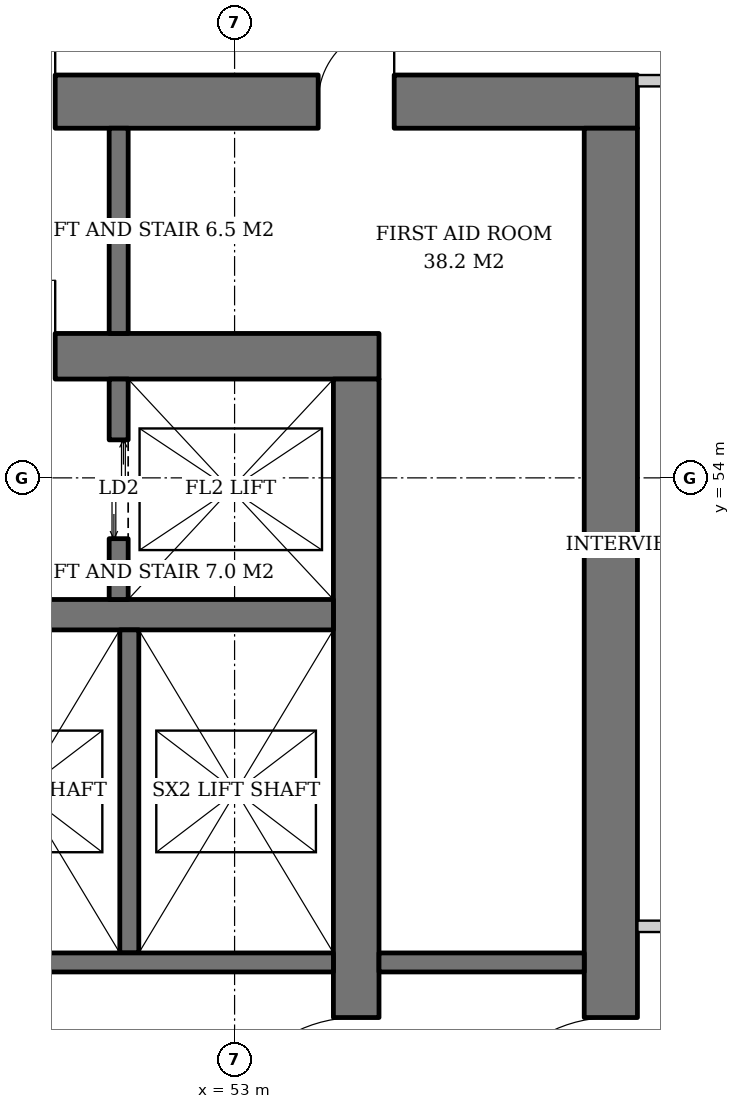
"""IFC4 building model, lengths in metres.
Left out: names, types, materials, properties, quantities, classifications, styles, units other than length and angle.
Written with IfcOpenShell. Run it as: python <this file> out.ifc"""

import sys

from ifc_helpers import new_model, si_unit, direction, frame, frame_2d, origin, place, context, subcontext, project, spatial, rectangle, extrude, element, fill, save


model = new_model("IFC4")
c1 = context("Model", 3, precision=1e-05, world=origin(), true_north=direction((0.0, 1.0)))
c2 = subcontext(c1, "Body", "Model", "MODEL_VIEW")
j1 = project(units=[si_unit("LENGTHUNIT", "METRE"), si_unit("PLANEANGLEUNIT", "RADIAN")], contexts=[c1])
p1 = place(None, origin())
s1 = spatial("IfcSite", under=j1, at=p1, CompositionType="ELEMENT")
p2 = place(p1, origin())
s2 = spatial("IfcBuilding", under=s1, at=p2, CompositionType="ELEMENT")
p3 = place(p2, frame((0.0, 0.0, 135.0)))
s3 = spatial("IfcBuildingStorey", under=s2, at=p3, CompositionType="ELEMENT", Elevation=135.0)
p4 = place(p3, frame((35.1, 55.6, 0.0), z_axis=(0.0, 0.0, 1.0), x_axis=(1.0, 0.0, 0.0)))
e1 = element("IfcWall", 1, at=p4, inside=s3, PredefinedType="SHEAR", context=c2, shape_type="SweptSolid", body=[
    extrude(rectangle(XDim=19.8, YDim=0.6, at=frame_2d((9.9, 0.0))), origin(), (0.0, 0.0, 1.0), 3.8),
])
p5 = place(p4, frame((14.54, 0.0, 0.0)))
e2 = element("IfcOpeningElement", 2, at=p5, cuts=e1, PredefinedType="OPENING", context=c2, shape_type="SweptSolid", body=[
    extrude(rectangle(XDim=1.0, YDim=2.1, at=frame_2d((0.5, 1.05))), frame((0.0, 0.31, 0.0), z_axis=(0.0, -1.0, 0.0), x_axis=(1.0, 0.0, 0.0)), (0.0, 0.0, 1.0), 0.62),
])
p6 = place(p4, frame((2.425, 0.0, 0.0)))
e3 = element("IfcOpeningElement", 3, at=p6, cuts=e1, PredefinedType="OPENING", context=c2, shape_type="SweptSolid", body=[
    extrude(rectangle(XDim=1.0, YDim=2.1, at=frame_2d((0.5, 1.05))), frame((0.0, 0.31, 0.0), z_axis=(0.0, -1.0, 0.0), x_axis=(1.0, 0.0, 0.0)), (0.0, 0.0, 1.0), 0.62),
])
p7 = place(p3, frame((54.6, 36.7, 0.0), z_axis=(0.0, 0.0, 1.0), x_axis=(0.0, 1.0, 0.0)))
e4 = element("IfcWall", 4, at=p7, inside=s3, PredefinedType="SHEAR", context=c2, shape_type="SweptSolid", body=[
    extrude(rectangle(XDim=18.6, YDim=0.6, at=frame_2d((9.3, 0.0))), origin(), (0.0, 0.0, 1.0), 3.8),
])
p8 = place(p7, frame((8.4, 0.0, 0.0)))
e5 = element("IfcOpeningElement", 5, at=p8, cuts=e4, PredefinedType="OPENING", context=c2, shape_type="SweptSolid", body=[
    extrude(rectangle(XDim=1.8, YDim=2.4, at=frame_2d((0.9, 1.2))), frame((0.0, 0.31, 0.0), z_axis=(0.0, -1.0, 0.0), x_axis=(1.0, 0.0, 0.0)), (0.0, 0.0, 1.0), 0.62),
])
p9 = place(p3, frame((31.7, 58.95, 0.0), z_axis=(0.0, 0.0, 1.0), x_axis=(1.0, 0.0, 0.0)))
e6 = element("IfcWall", 6, at=p9, inside=s3, PredefinedType="SHEAR", context=c2, shape_type="SweptSolid", body=[
    extrude(rectangle(XDim=26.6, YDim=0.7, at=frame_2d((13.3, 0.0))), origin(), (0.0, 0.0, 1.0), 3.8),
])
p10 = place(p9, frame((17.94, 0.0, 0.0)))
e7 = element("IfcOpeningElement", 7, at=p10, cuts=e6, PredefinedType="OPENING", context=c2, shape_type="SweptSolid", body=[
    extrude(rectangle(XDim=1.0, YDim=2.1, at=frame_2d((0.5, 1.05))), frame((0.0, 0.36, 0.0), z_axis=(0.0, -1.0, 0.0), x_axis=(1.0, 0.0, 0.0)), (0.0, 0.0, 1.0), 0.72),
])
p11 = place(p9, frame((5.825, 0.0, 0.0)))
e8 = element("IfcOpeningElement", 8, at=p11, cuts=e6, PredefinedType="OPENING", context=c2, shape_type="SweptSolid", body=[
    extrude(rectangle(XDim=1.0, YDim=2.1, at=frame_2d((0.5, 1.05))), frame((0.0, 0.36, 0.0), z_axis=(0.0, -1.0, 0.0), x_axis=(1.0, 0.0, 0.0)), (0.0, 0.0, 1.0), 0.72),
])
p12 = place(p9, frame((1.073, 0.0, 0.0)))
e9 = element("IfcOpeningElement", 9, at=p12, cuts=e6, PredefinedType="OPENING", context=c2, shape_type="SweptSolid", body=[
    extrude(rectangle(XDim=1.0, YDim=2.1, at=frame_2d((0.5, 1.05))), frame((0.0, 0.36, 0.0), z_axis=(0.0, -1.0, 0.0), x_axis=(1.0, 0.0, 0.0)), (0.0, 0.0, 1.0), 0.72),
])
p13 = place(p9, frame((2.611, 0.0, 0.0)))
e10 = element("IfcOpeningElement", 10, at=p13, cuts=e6, PredefinedType="OPENING", context=c2, shape_type="SweptSolid", body=[
    extrude(rectangle(XDim=1.0, YDim=2.1, at=frame_2d((0.5, 1.05))), frame((0.0, 0.36, 0.0), z_axis=(0.0, -1.0, 0.0), x_axis=(1.0, 0.0, 0.0)), (0.0, 0.0, 1.0), 0.72),
])
p14 = place(p9, frame((4.187, 0.0, 0.0)))
e11 = element("IfcOpeningElement", 11, at=p14, cuts=e6, PredefinedType="OPENING", context=c2, shape_type="SweptSolid", body=[
    extrude(rectangle(XDim=1.0, YDim=2.1, at=frame_2d((0.5, 1.05))), frame((0.0, 0.36, 0.0), z_axis=(0.0, -1.0, 0.0), x_axis=(1.0, 0.0, 0.0)), (0.0, 0.0, 1.0), 0.72),
])
p15 = place(p9, frame((8.44, 0.0, 0.0)))
e12 = element("IfcOpeningElement", 12, at=p15, cuts=e6, PredefinedType="OPENING", context=c2, shape_type="SweptSolid", body=[
    extrude(rectangle(XDim=1.0, YDim=2.1, at=frame_2d((0.5, 1.05))), frame((0.0, 0.36, 0.0), z_axis=(0.0, -1.0, 0.0), x_axis=(1.0, 0.0, 0.0)), (0.0, 0.0, 1.0), 0.72),
])
p16 = place(p9, frame((13.342, 0.0, 0.0)))
e13 = element("IfcOpeningElement", 13, at=p16, cuts=e6, PredefinedType="OPENING", context=c2, shape_type="SweptSolid", body=[
    extrude(rectangle(XDim=1.0, YDim=2.1, at=frame_2d((0.5, 1.05))), frame((0.0, 0.36, 0.0), z_axis=(0.0, -1.0, 0.0), x_axis=(1.0, 0.0, 0.0)), (0.0, 0.0, 1.0), 0.72),
])
p17 = place(p9, frame((22.4, 0.0, 0.0)))
e14 = element("IfcOpeningElement", 14, at=p17, cuts=e6, PredefinedType="OPENING", context=c2, shape_type="SweptSolid", body=[
    extrude(rectangle(XDim=1.0, YDim=2.1, at=frame_2d((0.5, 1.05))), frame((0.0, 0.36, 0.0), z_axis=(0.0, -1.0, 0.0), x_axis=(1.0, 0.0, 0.0)), (0.0, 0.0, 1.0), 0.72),
])
p18 = place(p3, frame((57.95, 33.4, 0.0), z_axis=(0.0, 0.0, 1.0), x_axis=(0.0, 1.0, 0.0)))
e15 = element("IfcWall", 15, at=p18, inside=s3, PredefinedType="SHEAR", context=c2, shape_type="SweptSolid", body=[
    extrude(rectangle(XDim=25.2, YDim=0.7, at=frame_2d((12.6, 0.0))), origin(), (0.0, 0.0, 1.0), 3.8),
])
p19 = place(p18, frame((11.7, 0.0, 0.0)))
e16 = element("IfcOpeningElement", 16, at=p19, cuts=e15, PredefinedType="OPENING", context=c2, shape_type="SweptSolid", body=[
    extrude(rectangle(XDim=1.8, YDim=2.4, at=frame_2d((0.9, 1.2))), frame((0.0, 0.36, 0.0), z_axis=(0.0, -1.0, 0.0), x_axis=(1.0, 0.0, 0.0)), (0.0, 0.0, 1.0), 0.72),
])
p20 = place(p3, frame((35.7, 52.2, 0.0), z_axis=(0.0, 0.0, 1.0), x_axis=(1.0, 0.0, 0.0)))
e17 = element("IfcWall", 17, at=p20, inside=s3, PredefinedType="SHEAR", context=c2, shape_type="SweptSolid", body=[
    extrude(rectangle(XDim=18.6, YDim=0.4, at=frame_2d((9.3, 0.0))), origin(), (0.0, 0.0, 1.0), 3.8),
])
p21 = place(p3, frame((51.475, 52.4, 0.0), z_axis=(0.0, 0.0, 1.0), x_axis=(0.0, 1.0, 0.0)))
e18 = element("IfcWall", 18, at=p21, inside=s3, PredefinedType="SHEAR", context=c2, shape_type="SweptSolid", body=[
    extrude(rectangle(XDim=2.9, YDim=0.25, at=frame_2d((1.45, 0.0))), origin(), (0.0, 0.0, 1.0), 3.8),
])
p22 = place(p21, frame((0.8, 0.0, 0.0)))
e19 = element("IfcOpeningElement", 19, at=p22, cuts=e18, PredefinedType="OPENING", context=c2, shape_type="SweptSolid", body=[
    extrude(rectangle(XDim=1.3, YDim=2.2, at=frame_2d((0.65, 1.1))), frame((0.0, 0.135, 0.0), z_axis=(0.0, -1.0, 0.0), x_axis=(1.0, 0.0, 0.0)), (0.0, 0.0, 1.0), 0.27),
])
p23 = place(p3, frame((51.615, 47.75, 0.0), z_axis=(0.0, 0.0, 1.0), x_axis=(0.0, 1.0, 0.0)))
e20 = element("IfcWall", 20, at=p23, inside=s3, PredefinedType="SHEAR", context=c2, shape_type="SweptSolid", body=[
    extrude(rectangle(XDim=4.25, YDim=0.25, at=frame_2d((2.125, 0.0))), origin(), (0.0, 0.0, 1.0), 3.8),
])
p24 = place(p3, frame((48.93, 47.625, 0.0), z_axis=(0.0, 0.0, 1.0), x_axis=(1.0, 0.0, 0.0)))
e21 = element("IfcWall", 21, at=p24, inside=s3, PredefinedType="SHEAR", context=c2, shape_type="SweptSolid", body=[
    extrude(rectangle(XDim=5.37, YDim=0.25, at=frame_2d((2.685, 0.0))), origin(), (0.0, 0.0, 1.0), 3.8),
])
for number, where, z_axis, x_axis in (
    (22, (51.475, 55.9, 0.0), (0.0, 0.0, 1.0), (0.0, 1.0, 0.0)),
    (23, (54.9, 47.625, 0.0), (0.0, 0.0, 1.0), (1.0, 0.0, 0.0)),
):
    element("IfcWall", number, at=place(p3, frame(where, z_axis=z_axis, x_axis=x_axis)), inside=s3, PredefinedType="SOLIDWALL", context=c2, shape_type="SweptSolid", body=[
        extrude(rectangle(XDim=2.7, YDim=0.25, at=frame_2d((1.35, 0.0))), origin(), (0.0, 0.0, 1.0), 3.62),
    ])
for number, where, z_axis, x_axis in (
    (24, (58.3, 48.1, 0.0), (0.0, 0.0, 1.0), (1.0, 0.0, 0.0)),
    (25, (58.3, 59.225, 0.0), (0.0, 0.0, 1.0), (1.0, 0.0, 0.0)),
):
    element("IfcWall", number, at=place(p3, frame(where, z_axis=z_axis, x_axis=x_axis)), inside=s3, PredefinedType="PARTITIONING", context=c2, shape_type="SweptSolid", body=[
        extrude(rectangle(XDim=1.725, YDim=0.15, at=frame_2d((0.862, 0.0))), origin(), (0.0, 0.0, 1.0), 3.62),
    ])
p25 = place(p22, origin())
e26 = element("IfcDoor", 26, at=p25, inside=s3, OperationType="DOUBLE_DOOR_SLIDING", PredefinedType="DOOR", context=c2, shape_type="SweptSolid", body=[
    extrude(rectangle(XDim=1.3, YDim=2.2, at=frame_2d((0.65, 1.1))), frame((0.0, 0.025, 0.0), z_axis=(0.0, -1.0, 0.0), x_axis=(1.0, 0.0, 0.0)), (0.0, 0.0, 1.0), 0.05),
])
fill(e19, e26)
p26 = place(p5, origin())
e27 = element("IfcDoor", 27, at=p26, inside=s3, OperationType="SINGLE_SWING_RIGHT", PredefinedType="DOOR", context=c2, shape_type="SweptSolid", body=[
    extrude(rectangle(XDim=1.0, YDim=2.1, at=frame_2d((0.5, 1.05))), frame((0.0, 0.025, 0.0), z_axis=(0.0, -1.0, 0.0), x_axis=(1.0, 0.0, 0.0)), (0.0, 0.0, 1.0), 0.05),
])
fill(e2, e27)
p27 = place(p8, origin())
e28 = element("IfcDoor", 28, at=p27, inside=s3, OperationType="DOUBLE_DOOR_SINGLE_SWING", PredefinedType="DOOR", context=c2, shape_type="SweptSolid", body=[
    extrude(rectangle(XDim=1.8, YDim=2.4, at=frame_2d((0.9, 1.2))), frame((0.0, 0.025, 0.0), z_axis=(0.0, -1.0, 0.0), x_axis=(1.0, 0.0, 0.0)), (0.0, 0.0, 1.0), 0.05),
])
fill(e5, e28)
p28 = place(p19, origin())
e29 = element("IfcDoor", 29, at=p28, inside=s3, OperationType="DOUBLE_DOOR_SINGLE_SWING", PredefinedType="DOOR", context=c2, shape_type="SweptSolid", body=[
    extrude(rectangle(XDim=1.8, YDim=2.4, at=frame_2d((0.9, 1.2))), frame((0.0, 0.025, 0.0), z_axis=(0.0, -1.0, 0.0), x_axis=(1.0, 0.0, 0.0)), (0.0, 0.0, 1.0), 0.05),
])
fill(e16, e29)
p29 = place(p10, origin())
e30 = element("IfcDoor", 30, at=p29, inside=s3, OperationType="SINGLE_SWING_RIGHT", PredefinedType="DOOR", context=c2, shape_type="SweptSolid", body=[
    extrude(rectangle(XDim=1.0, YDim=2.1, at=frame_2d((0.5, 1.05))), frame((0.0, 0.025, 0.0), z_axis=(0.0, -1.0, 0.0), x_axis=(1.0, 0.0, 0.0)), (0.0, 0.0, 1.0), 0.05),
])
fill(e7, e30)
p30 = place(p17, origin())
e31 = element("IfcDoor", 31, at=p30, inside=s3, OperationType="SINGLE_SWING_RIGHT", PredefinedType="DOOR", context=c2, shape_type="SweptSolid", body=[
    extrude(rectangle(XDim=1.0, YDim=2.1, at=frame_2d((0.5, 1.05))), frame((0.0, -0.29, 0.0), z_axis=(0.0, -1.0, 0.0), x_axis=(1.0, 0.0, 0.0)), (0.0, 0.0, 1.0), 0.05),
])
fill(e14, e31)
save(model, sys.argv[1])
